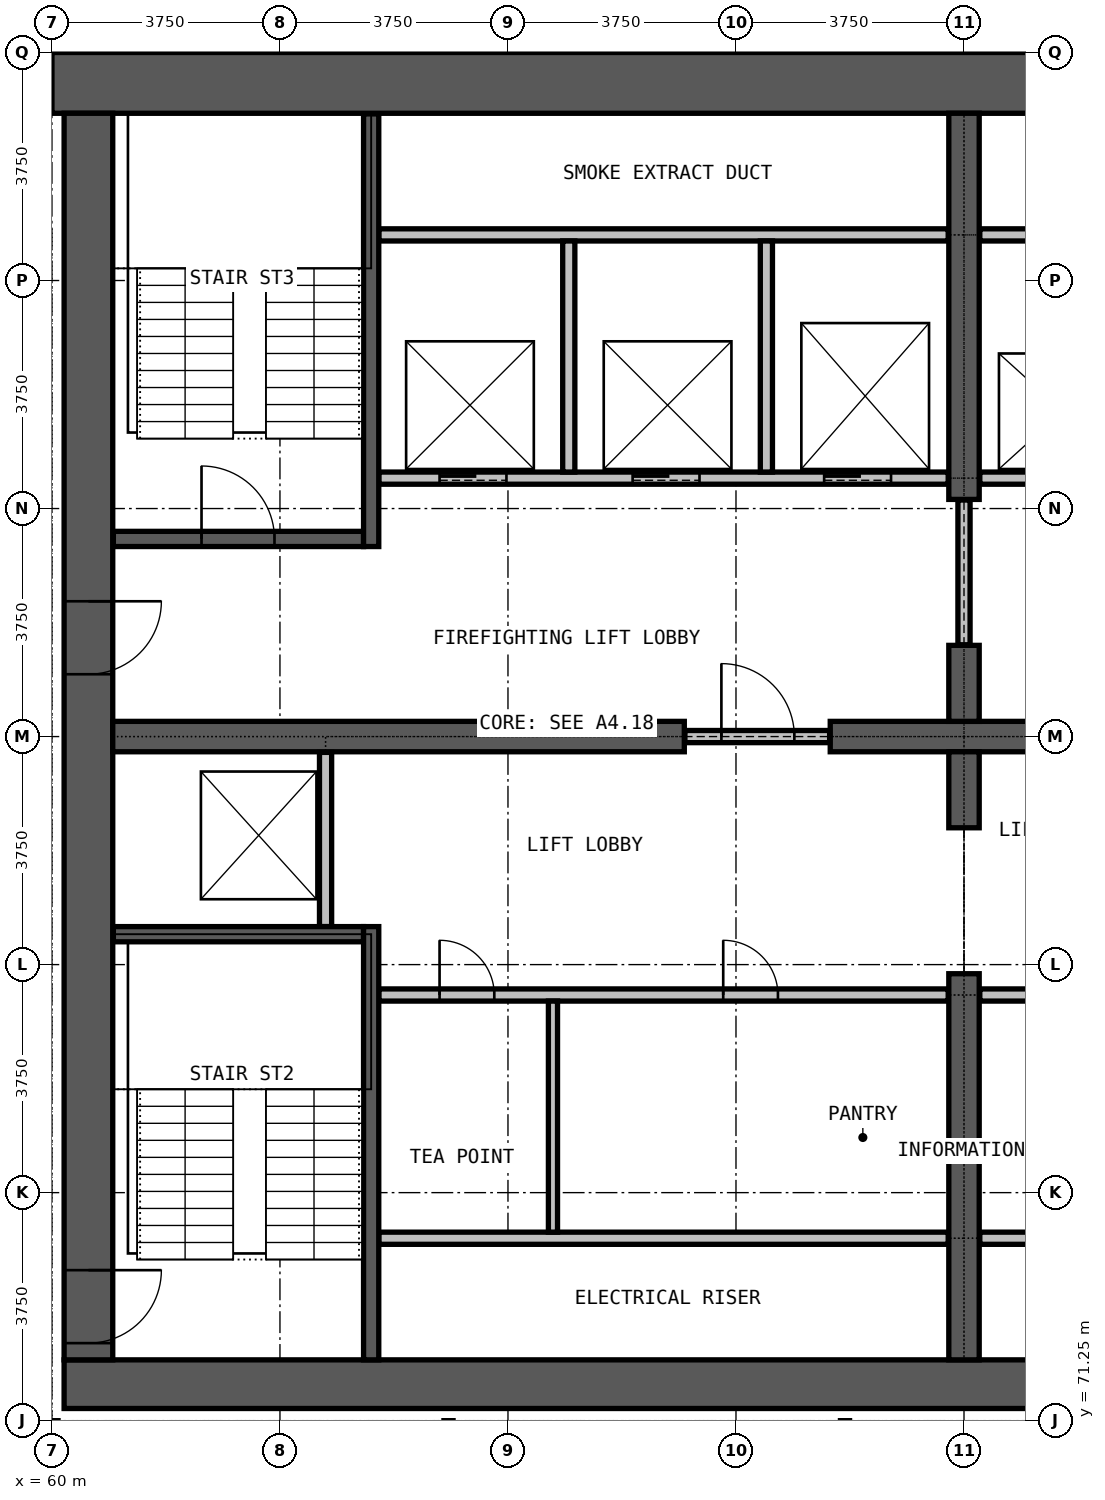
"""IFC4 building model, lengths in metres.
Left out: names, types, materials, properties, quantities, classifications, styles, units other than length and angle.
Written with IfcOpenShell. Run it as: python <this file> out.ifc"""

import sys

from ifc_helpers import new_model, si_unit, direction, frame, frame_2d, origin, place, context, subcontext, project, spatial, rectangle, extrude, element, fill, save


model = new_model("IFC4")
c1 = context("Model", 3, precision=1e-05, world=origin(), true_north=direction((0.0, 1.0)))
c2 = subcontext(c1, "Body", "Model", "MODEL_VIEW")
j1 = project(units=[si_unit("LENGTHUNIT", "METRE"), si_unit("PLANEANGLEUNIT", "RADIAN")], contexts=[c1])
p1 = place(None, origin())
s1 = spatial("IfcSite", under=j1, at=p1, CompositionType="ELEMENT")
p2 = place(p1, origin())
s2 = spatial("IfcBuilding", under=s1, at=p2, CompositionType="ELEMENT")
p3 = place(p2, frame((0.0, 0.0, 154.9)))
s3 = spatial("IfcBuildingStorey", under=s2, at=p3, CompositionType="ELEMENT", Elevation=154.9)
p4 = place(p3, frame((60.2, 71.85, 0.0), z_axis=(0.0, 0.0, 1.0), x_axis=(1.0, 0.0, 0.0)))
e1 = element("IfcWall", 1, at=p4, inside=s3, PredefinedType="SHEAR", context=c2, shape_type="SweptSolid", body=[
    extrude(rectangle(XDim=29.6, YDim=0.8, at=frame_2d((14.8, 0.0))), origin(), (0.0, 0.0, 1.0), 3.6),
])
p5 = place(p3, frame((90.0, 93.25, 0.0), z_axis=(0.0, 0.0, 1.0), x_axis=(-1.0, 0.0, 0.0)))
e2 = element("IfcWall", 2, at=p5, inside=s3, PredefinedType="SHEAR", context=c2, shape_type="SweptSolid", body=[
    extrude(rectangle(XDim=30.0, YDim=1.0, at=frame_2d((15.0, 0.0))), origin(), (0.0, 0.0, 1.0), 3.6),
])
p6 = place(p3, frame((60.6, 92.75, 0.0), z_axis=(0.0, 0.0, 1.0), x_axis=(0.0, -1.0, 0.0)))
e3 = element("IfcWall", 3, at=p6, inside=s3, PredefinedType="SHEAR", context=c2, shape_type="SweptSolid", body=[
    extrude(rectangle(XDim=20.5, YDim=0.8, at=frame_2d((10.25, 0.0))), origin(), (0.0, 0.0, 1.0), 3.6),
])
p7 = place(p6, frame((19.025, 0.0, 0.0)))
e4 = element("IfcOpeningElement", 4, at=p7, cuts=e3, PredefinedType="OPENING", context=c2, shape_type="SweptSolid", body=[
    extrude(rectangle(XDim=1.2, YDim=2.2, at=frame_2d((0.6, 1.1))), frame((0.0, 0.41, 0.0), z_axis=(0.0, -1.0, 0.0), x_axis=(1.0, 0.0, 0.0)), (0.0, 0.0, 1.0), 0.82),
])
p8 = place(p6, frame((8.025, 0.0, 0.0)))
e5 = element("IfcOpeningElement", 5, at=p8, cuts=e3, PredefinedType="OPENING", context=c2, shape_type="SweptSolid", body=[
    extrude(rectangle(XDim=1.2, YDim=2.2, at=frame_2d((0.6, 1.1))), frame((0.0, 0.41, 0.0), z_axis=(0.0, -1.0, 0.0), x_axis=(1.0, 0.0, 0.0)), (0.0, 0.0, 1.0), 0.82),
])
p9 = place(p3, frame((61.0, 82.5, 0.0), z_axis=(0.0, 0.0, 1.0), x_axis=(1.0, 0.0, 0.0)))
e6 = element("IfcWall", 6, at=p9, inside=s3, PredefinedType="SHEAR", context=c2, shape_type="SweptSolid", body=[
    extrude(rectangle(XDim=9.4, YDim=0.5, at=frame_2d((4.7, 0.0))), origin(), (0.0, 0.0, 1.0), 3.6),
])
p10 = place(p3, frame((72.8, 82.5, 0.0), z_axis=(0.0, 0.0, 1.0), x_axis=(1.0, 0.0, 0.0)))
e7 = element("IfcWall", 7, at=p10, inside=s3, PredefinedType="SHEAR", context=c2, shape_type="SweptSolid", body=[
    extrude(rectangle(XDim=4.4, YDim=0.5, at=frame_2d((2.2, 0.0))), origin(), (0.0, 0.0, 1.0), 3.6),
])
p11 = place(p3, frame((75.0, 72.25, 0.0), z_axis=(0.0, 0.0, 1.0), x_axis=(0.0, 1.0, 0.0)))
e8 = element("IfcWall", 8, at=p11, inside=s3, PredefinedType="SHEAR", context=c2, shape_type="SweptSolid", body=[
    extrude(rectangle(XDim=6.35, YDim=0.5, at=frame_2d((3.175, 0.0))), origin(), (0.0, 0.0, 1.0), 3.6),
])
for number, where, z_axis, x_axis in (
    (9, (75.0, 81.0, 0.0), (0.0, 0.0, 1.0), (0.0, 1.0, 0.0)),
    (10, (75.0, 82.75, 0.0), (0.0, 0.0, 1.0), (0.0, 1.0, 0.0)),
):
    element("IfcWall", number, at=place(p3, frame(where, z_axis=z_axis, x_axis=x_axis)), inside=s3, PredefinedType="SHEAR", context=c2, shape_type="SweptSolid", body=[
        extrude(rectangle(XDim=1.25, YDim=0.5, at=frame_2d((0.625, 0.0))), origin(), (0.0, 0.0, 1.0), 3.6),
    ])
p12 = place(p3, frame((75.0, 86.4, 0.0), z_axis=(0.0, 0.0, 1.0), x_axis=(0.0, 1.0, 0.0)))
e11 = element("IfcWall", 11, at=p12, inside=s3, PredefinedType="SHEAR", context=c2, shape_type="SweptSolid", body=[
    extrude(rectangle(XDim=6.35, YDim=0.5, at=frame_2d((3.175, 0.0))), origin(), (0.0, 0.0, 1.0), 3.6),
])
for number, where, z_axis, x_axis in (
    (12, (65.375, 74.25, 0.0), (0.0, 0.0, 1.0), (1.0, 0.0, 0.0)),
    (13, (75.26, 74.25, 0.0), (0.0, 0.0, 1.0), (1.0, 0.0, 0.0)),
):
    element("IfcWall", number, at=place(p3, frame(where, z_axis=z_axis, x_axis=x_axis)), inside=s3, PredefinedType="PARTITIONING", context=c2, shape_type="SweptSolid", body=[
        extrude(rectangle(XDim=9.365, YDim=0.2, at=frame_2d((4.683, 0.0))), origin(), (0.0, 0.0, 1.0), 3.3),
    ])
p13 = place(p3, frame((65.375, 78.25, 0.0), z_axis=(0.0, 0.0, 1.0), x_axis=(1.0, 0.0, 0.0)))
e14 = element("IfcWall", 14, at=p13, inside=s3, PredefinedType="PARTITIONING", context=c2, shape_type="SweptSolid", body=[
    extrude(rectangle(XDim=9.365, YDim=0.2, at=frame_2d((4.683, 0.0))), origin(), (0.0, 0.0, 1.0), 3.3),
])
p14 = place(p13, frame((1.0, 0.0, 0.0)))
e15 = element("IfcOpeningElement", 15, at=p14, cuts=e14, PredefinedType="OPENING", context=c2, shape_type="SweptSolid", body=[
    extrude(rectangle(XDim=0.9, YDim=2.2, at=frame_2d((0.45, 1.1))), frame((0.0, 0.11, 0.0), z_axis=(0.0, -1.0, 0.0), x_axis=(1.0, 0.0, 0.0)), (0.0, 0.0, 1.0), 0.22),
])
p15 = place(p13, frame((5.665, 0.0, 0.0)))
e16 = element("IfcOpeningElement", 16, at=p15, cuts=e14, PredefinedType="OPENING", context=c2, shape_type="SweptSolid", body=[
    extrude(rectangle(XDim=0.9, YDim=2.2, at=frame_2d((0.45, 1.1))), frame((0.0, 0.11, 0.0), z_axis=(0.0, -1.0, 0.0), x_axis=(1.0, 0.0, 0.0)), (0.0, 0.0, 1.0), 0.22),
])
p16 = place(p3, frame((75.26, 78.25, 0.0), z_axis=(0.0, 0.0, 1.0), x_axis=(1.0, 0.0, 0.0)))
e17 = element("IfcWall", 17, at=p16, inside=s3, PredefinedType="PARTITIONING", context=c2, shape_type="SweptSolid", body=[
    extrude(rectangle(XDim=9.365, YDim=0.2, at=frame_2d((4.683, 0.0))), origin(), (0.0, 0.0, 1.0), 3.3),
])
p17 = place(p16, frame((1.85, 0.0, 0.0)))
e18 = element("IfcOpeningElement", 18, at=p17, cuts=e17, PredefinedType="OPENING", context=c2, shape_type="SweptSolid", body=[
    extrude(rectangle(XDim=0.9, YDim=2.2, at=frame_2d((0.45, 1.1))), frame((0.0, 0.11, 0.0), z_axis=(0.0, -1.0, 0.0), x_axis=(1.0, 0.0, 0.0)), (0.0, 0.0, 1.0), 0.22),
])
p18 = place(p16, frame((6.515, 0.0, 0.0)))
e19 = element("IfcOpeningElement", 19, at=p18, cuts=e17, PredefinedType="OPENING", context=c2, shape_type="SweptSolid", body=[
    extrude(rectangle(XDim=0.9, YDim=2.2, at=frame_2d((0.45, 1.1))), frame((0.0, 0.11, 0.0), z_axis=(0.0, -1.0, 0.0), x_axis=(1.0, 0.0, 0.0)), (0.0, 0.0, 1.0), 0.22),
])
p19 = place(p3, frame((70.41, 82.5, 0.0), z_axis=(0.0, 0.0, 1.0), x_axis=(1.0, 0.0, 0.0)))
e20 = element("IfcWall", 20, at=p19, inside=s3, PredefinedType="PARTITIONING", context=c2, shape_type="SweptSolid", body=[
    extrude(rectangle(XDim=2.38, YDim=0.2, at=frame_2d((1.19, 0.0))), origin(), (0.0, 0.0, 1.0), 2.4),
])
p20 = place(p19, frame((0.6, 0.0, 0.0)))
e21 = element("IfcOpeningElement", 21, at=p20, cuts=e20, PredefinedType="OPENING", context=c2, shape_type="SweptSolid", body=[
    extrude(rectangle(XDim=1.2, YDim=2.2, at=frame_2d((0.6, 1.1))), frame((0.0, 0.11, 0.0), z_axis=(0.0, -1.0, 0.0), x_axis=(1.0, 0.0, 0.0)), (0.0, 0.0, 1.0), 0.22),
])
p21 = place(p3, frame((75.0, 84.01, 0.0), z_axis=(0.0, 0.0, 1.0), x_axis=(0.0, 1.0, 0.0)))
e22 = element("IfcWall", 22, at=p21, inside=s3, PredefinedType="PARTITIONING", context=c2, shape_type="SweptSolid", body=[
    extrude(rectangle(XDim=2.38, YDim=0.2, at=frame_2d((1.19, 0.0))), origin(), (0.0, 0.0, 1.0), 2.4),
])
p22 = place(p3, frame((68.24, 74.35, 0.0), z_axis=(0.0, 0.0, 1.0), x_axis=(0.0, 1.0, 0.0)))
e23 = element("IfcWall", 23, at=p22, inside=s3, PredefinedType="PARTITIONING", context=c2, shape_type="SweptSolid", body=[
    extrude(rectangle(XDim=3.8, YDim=0.15, at=frame_2d((1.9, 0.0))), origin(), (0.0, 0.0, 1.0), 3.3),
])
p23 = place(p3, frame((65.375, 86.75, 0.0), z_axis=(0.0, 0.0, 1.0), x_axis=(1.0, 0.0, 0.0)))
e24 = element("IfcWall", 24, at=p23, inside=s3, PredefinedType="PARTITIONING", context=c2, shape_type="SweptSolid", body=[
    extrude(rectangle(XDim=9.365, YDim=0.2, at=frame_2d((4.683, 0.0))), origin(), (0.0, 0.0, 1.0), 3.3),
])
p24 = place(p23, frame((1.0, 0.0, 0.0)))
e25 = element("IfcOpeningElement", 25, at=p24, cuts=e24, PredefinedType="OPENING", context=c2, shape_type="SweptSolid", body=[
    extrude(rectangle(XDim=1.1, YDim=2.2, at=frame_2d((0.55, 1.1))), frame((0.0, 0.11, 0.0), z_axis=(0.0, -1.0, 0.0), x_axis=(1.0, 0.0, 0.0)), (0.0, 0.0, 1.0), 0.22),
])
p25 = place(p23, frame((4.175, 0.0, 0.0)))
e26 = element("IfcOpeningElement", 26, at=p25, cuts=e24, PredefinedType="OPENING", context=c2, shape_type="SweptSolid", body=[
    extrude(rectangle(XDim=1.1, YDim=2.2, at=frame_2d((0.55, 1.1))), frame((0.0, 0.11, 0.0), z_axis=(0.0, -1.0, 0.0), x_axis=(1.0, 0.0, 0.0)), (0.0, 0.0, 1.0), 0.22),
])
p26 = place(p23, frame((7.325, 0.0, 0.0)))
e27 = element("IfcOpeningElement", 27, at=p26, cuts=e24, PredefinedType="OPENING", context=c2, shape_type="SweptSolid", body=[
    extrude(rectangle(XDim=1.1, YDim=2.2, at=frame_2d((0.55, 1.1))), frame((0.0, 0.11, 0.0), z_axis=(0.0, -1.0, 0.0), x_axis=(1.0, 0.0, 0.0)), (0.0, 0.0, 1.0), 0.22),
])
p27 = place(p3, frame((75.26, 86.75, 0.0), z_axis=(0.0, 0.0, 1.0), x_axis=(1.0, 0.0, 0.0)))
e28 = element("IfcWall", 28, at=p27, inside=s3, PredefinedType="PARTITIONING", context=c2, shape_type="SweptSolid", body=[
    extrude(rectangle(XDim=9.365, YDim=0.2, at=frame_2d((4.683, 0.0))), origin(), (0.0, 0.0, 1.0), 3.3),
])
p28 = place(p27, frame((0.95, 0.0, 0.0)))
e29 = element("IfcOpeningElement", 29, at=p28, cuts=e28, PredefinedType="OPENING", context=c2, shape_type="SweptSolid", body=[
    extrude(rectangle(XDim=1.1, YDim=2.2, at=frame_2d((0.55, 1.1))), frame((0.0, 0.11, 0.0), z_axis=(0.0, -1.0, 0.0), x_axis=(1.0, 0.0, 0.0)), (0.0, 0.0, 1.0), 0.22),
])
p29 = place(p27, frame((4.09, 0.0, 0.0)))
e30 = element("IfcOpeningElement", 30, at=p29, cuts=e28, PredefinedType="OPENING", context=c2, shape_type="SweptSolid", body=[
    extrude(rectangle(XDim=1.1, YDim=2.2, at=frame_2d((0.55, 1.1))), frame((0.0, 0.11, 0.0), z_axis=(0.0, -1.0, 0.0), x_axis=(1.0, 0.0, 0.0)), (0.0, 0.0, 1.0), 0.22),
])
p30 = place(p27, frame((7.24, 0.0, 0.0)))
e31 = element("IfcOpeningElement", 31, at=p30, cuts=e28, PredefinedType="OPENING", context=c2, shape_type="SweptSolid", body=[
    extrude(rectangle(XDim=1.1, YDim=2.2, at=frame_2d((0.55, 1.1))), frame((0.0, 0.11, 0.0), z_axis=(0.0, -1.0, 0.0), x_axis=(1.0, 0.0, 0.0)), (0.0, 0.0, 1.0), 0.22),
])
for number, where, z_axis, x_axis in (
    (32, (65.375, 90.75, 0.0), (0.0, 0.0, 1.0), (1.0, 0.0, 0.0)),
    (33, (75.26, 90.75, 0.0), (0.0, 0.0, 1.0), (1.0, 0.0, 0.0)),
):
    element("IfcWall", number, at=place(p3, frame(where, z_axis=z_axis, x_axis=x_axis)), inside=s3, PredefinedType="PARTITIONING", context=c2, shape_type="SweptSolid", body=[
        extrude(rectangle(XDim=9.365, YDim=0.2, at=frame_2d((4.683, 0.0))), origin(), (0.0, 0.0, 1.0), 3.3),
    ])
p31 = place(p3, frame((64.5, 79.375, 0.0), z_axis=(0.0, 0.0, 1.0), x_axis=(0.0, 1.0, 0.0)))
e34 = element("IfcWall", 34, at=p31, inside=s3, PredefinedType="PARTITIONING", context=c2, shape_type="SweptSolid", body=[
    extrude(rectangle(XDim=2.865, YDim=0.2, at=frame_2d((1.433, 0.0))), origin(), (0.0, 0.0, 1.0), 3.3),
])
for number, where, z_axis, x_axis in (
    (35, (68.5, 86.85, 0.0), (0.0, 0.0, 1.0), (0.0, 1.0, 0.0)),
    (36, (71.75, 86.85, 0.0), (0.0, 0.0, 1.0), (0.0, 1.0, 0.0)),
):
    element("IfcWall", number, at=place(p3, frame(where, z_axis=z_axis, x_axis=x_axis)), inside=s3, PredefinedType="PARTITIONING", context=c2, shape_type="SweptSolid", body=[
        extrude(rectangle(XDim=3.8, YDim=0.2, at=frame_2d((1.9, 0.0))), origin(), (0.0, 0.0, 1.0), 3.3),
    ])
p32 = place(p3, frame((61.01, 79.25, 0.0), z_axis=(0.0, 0.0, 1.0), x_axis=(1.0, 0.0, 0.0)))
e37 = element("IfcWall", 37, at=p32, inside=s3, PredefinedType="PARTITIONING", context=c2, shape_type="SweptSolid", body=[
    extrude(rectangle(XDim=4.115, YDim=0.25, at=frame_2d((2.058, 0.0))), origin(), (0.0, 0.0, 1.0), 3.3),
])
p33 = place(p3, frame((61.01, 85.75, 0.0), z_axis=(0.0, 0.0, 1.0), x_axis=(1.0, 0.0, 0.0)))
e38 = element("IfcWall", 38, at=p33, inside=s3, PredefinedType="PARTITIONING", context=c2, shape_type="SweptSolid", body=[
    extrude(rectangle(XDim=4.115, YDim=0.25, at=frame_2d((2.058, 0.0))), origin(), (0.0, 0.0, 1.0), 3.3),
])
p34 = place(p33, frame((1.45, 0.0, 0.0)))
e39 = element("IfcOpeningElement", 39, at=p34, cuts=e38, PredefinedType="OPENING", context=c2, shape_type="SweptSolid", body=[
    extrude(rectangle(XDim=1.2, YDim=2.2, at=frame_2d((0.6, 1.1))), frame((0.0, 0.135, 0.0), z_axis=(0.0, -1.0, 0.0), x_axis=(1.0, 0.0, 0.0)), (0.0, 0.0, 1.0), 0.27),
])
p35 = place(p3, frame((65.25, 72.25, 0.0), z_axis=(0.0, 0.0, 1.0), x_axis=(0.0, 1.0, 0.0)))
e40 = element("IfcWall", 40, at=p35, inside=s3, PredefinedType="PARTITIONING", context=c2, shape_type="SweptSolid", body=[
    extrude(rectangle(XDim=7.125, YDim=0.25, at=frame_2d((3.562, 0.0))), origin(), (0.0, 0.0, 1.0), 3.3),
])
p36 = place(p3, frame((65.25, 85.625, 0.0), z_axis=(0.0, 0.0, 1.0), x_axis=(0.0, 1.0, 0.0)))
e41 = element("IfcWall", 41, at=p36, inside=s3, PredefinedType="PARTITIONING", context=c2, shape_type="SweptSolid", body=[
    extrude(rectangle(XDim=7.115, YDim=0.25, at=frame_2d((3.558, 0.0))), origin(), (0.0, 0.0, 1.0), 3.3),
])
p37 = place(p24, origin())
e42 = element("IfcDoor", 42, at=p37, inside=s3, OperationType="DOUBLE_DOOR_SLIDING", PredefinedType="DOOR", context=c2, shape_type="SweptSolid", body=[
    extrude(rectangle(XDim=1.1, YDim=2.2, at=frame_2d((0.55, 1.1))), frame((0.0, 0.025, 0.0), z_axis=(0.0, -1.0, 0.0), x_axis=(1.0, 0.0, 0.0)), (0.0, 0.0, 1.0), 0.05),
])
fill(e25, e42)
p38 = place(p25, origin())
e43 = element("IfcDoor", 43, at=p38, inside=s3, OperationType="DOUBLE_DOOR_SLIDING", PredefinedType="DOOR", context=c2, shape_type="SweptSolid", body=[
    extrude(rectangle(XDim=1.1, YDim=2.2, at=frame_2d((0.55, 1.1))), frame((0.0, 0.025, 0.0), z_axis=(0.0, -1.0, 0.0), x_axis=(1.0, 0.0, 0.0)), (0.0, 0.0, 1.0), 0.05),
])
fill(e26, e43)
p39 = place(p26, origin())
e44 = element("IfcDoor", 44, at=p39, inside=s3, OperationType="DOUBLE_DOOR_SLIDING", PredefinedType="DOOR", context=c2, shape_type="SweptSolid", body=[
    extrude(rectangle(XDim=1.1, YDim=2.2, at=frame_2d((0.55, 1.1))), frame((0.0, 0.025, 0.0), z_axis=(0.0, -1.0, 0.0), x_axis=(1.0, 0.0, 0.0)), (0.0, 0.0, 1.0), 0.05),
])
fill(e27, e44)
p40 = place(p20, origin())
e45 = element("IfcDoor", 45, at=p40, inside=s3, OperationType="SINGLE_SWING_RIGHT", PredefinedType="DOOR", context=c2, shape_type="SweptSolid", body=[
    extrude(rectangle(XDim=1.2, YDim=2.2, at=frame_2d((0.6, 1.1))), frame((0.0, 0.025, 0.0), z_axis=(0.0, -1.0, 0.0), x_axis=(1.0, 0.0, 0.0)), (0.0, 0.0, 1.0), 0.05),
])
fill(e21, e45)
p41 = place(p34, origin())
e46 = element("IfcDoor", 46, at=p41, inside=s3, OperationType="SINGLE_SWING_RIGHT", PredefinedType="DOOR", context=c2, shape_type="SweptSolid", body=[
    extrude(rectangle(XDim=1.2, YDim=2.2, at=frame_2d((0.6, 1.1))), frame((0.0, 0.025, 0.0), z_axis=(0.0, -1.0, 0.0), x_axis=(1.0, 0.0, 0.0)), (0.0, 0.0, 1.0), 0.05),
])
fill(e39, e46)
p42 = place(p7, origin())
e47 = element("IfcDoor", 47, at=p42, inside=s3, OperationType="SINGLE_SWING_RIGHT", PredefinedType="DOOR", context=c2, shape_type="SweptSolid", body=[
    extrude(rectangle(XDim=1.2, YDim=2.2, at=frame_2d((0.6, 1.1))), frame((0.0, 0.025, 0.0), z_axis=(0.0, -1.0, 0.0), x_axis=(1.0, 0.0, 0.0)), (0.0, 0.0, 1.0), 0.05),
])
fill(e4, e47)
p43 = place(p8, origin())
e48 = element("IfcDoor", 48, at=p43, inside=s3, OperationType="SINGLE_SWING_LEFT", PredefinedType="DOOR", context=c2, shape_type="SweptSolid", body=[
    extrude(rectangle(XDim=1.2, YDim=2.2, at=frame_2d((0.6, 1.1))), frame((0.0, 0.025, 0.0), z_axis=(0.0, -1.0, 0.0), x_axis=(1.0, 0.0, 0.0)), (0.0, 0.0, 1.0), 0.05),
])
fill(e5, e48)
p44 = place(p14, origin())
e49 = element("IfcDoor", 49, at=p44, inside=s3, OperationType="SINGLE_SWING_LEFT", PredefinedType="DOOR", context=c2, shape_type="SweptSolid", body=[
    extrude(rectangle(XDim=0.9, YDim=2.2, at=frame_2d((0.45, 1.1))), frame((0.0, 0.025, 0.0), z_axis=(0.0, -1.0, 0.0), x_axis=(1.0, 0.0, 0.0)), (0.0, 0.0, 1.0), 0.05),
])
fill(e15, e49)
p45 = place(p15, origin())
e50 = element("IfcDoor", 50, at=p45, inside=s3, OperationType="SINGLE_SWING_LEFT", PredefinedType="DOOR", context=c2, shape_type="SweptSolid", body=[
    extrude(rectangle(XDim=0.9, YDim=2.2, at=frame_2d((0.45, 1.1))), frame((0.0, 0.025, 0.0), z_axis=(0.0, -1.0, 0.0), x_axis=(1.0, 0.0, 0.0)), (0.0, 0.0, 1.0), 0.05),
])
fill(e16, e50)
save(model, sys.argv[1])
